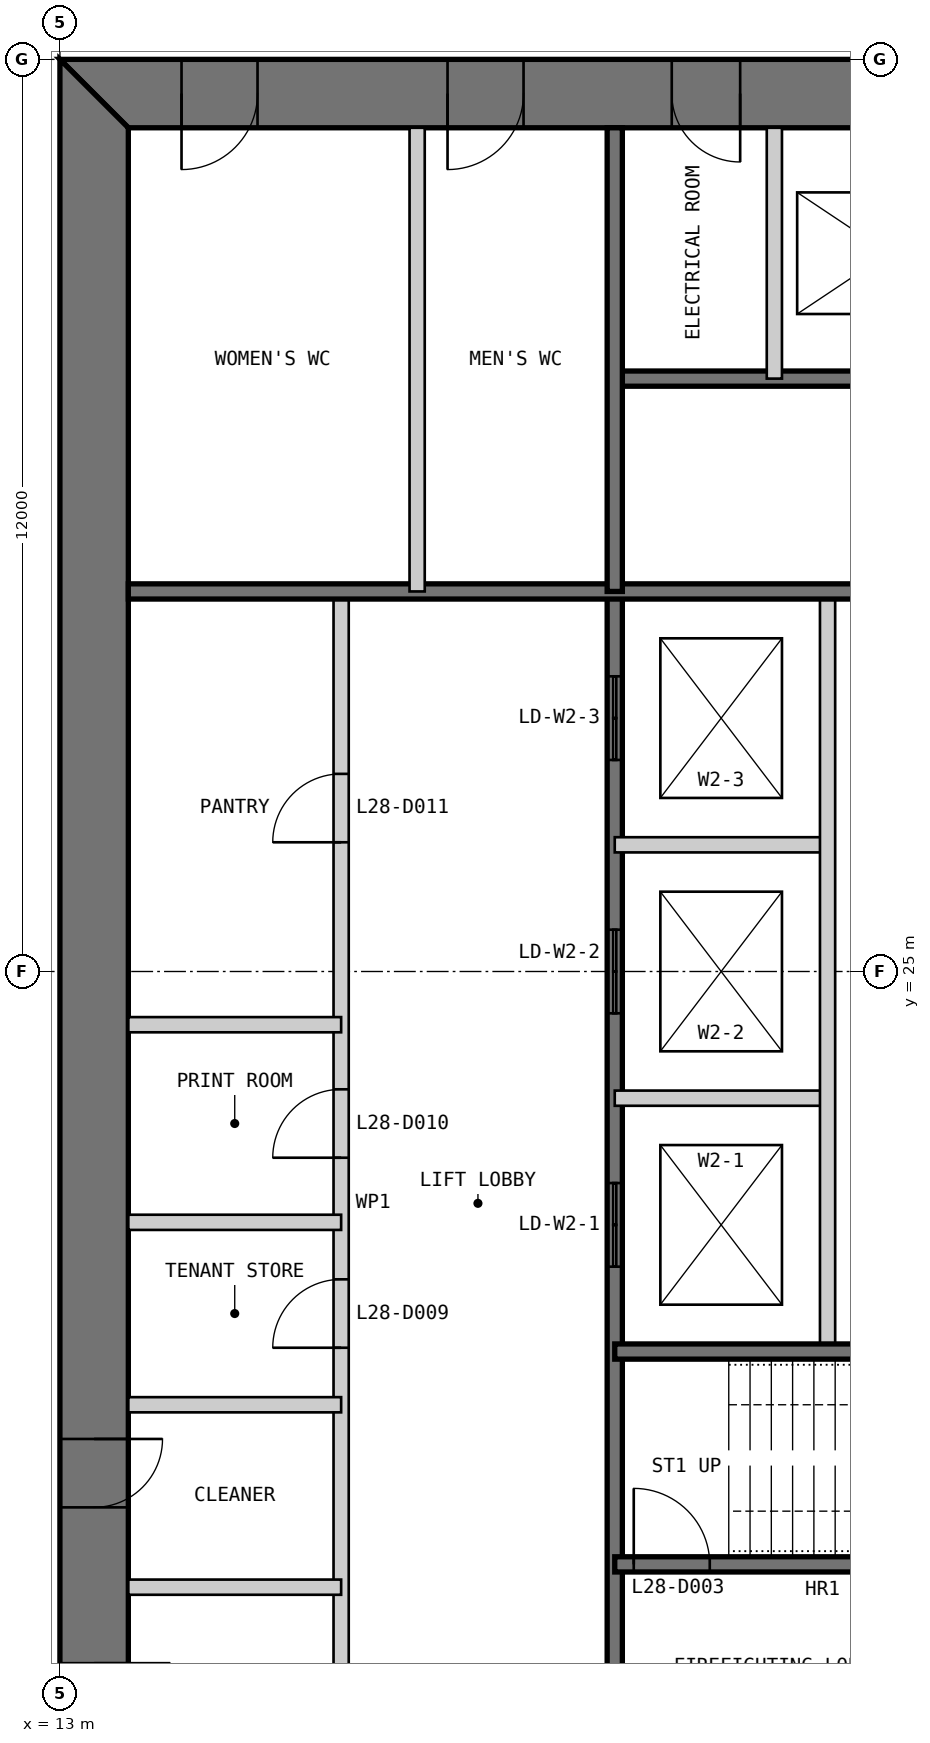
"""IFC4 building model, lengths in metres.
Left out: names, types, materials, properties, quantities, classifications, styles, units other than length and angle.
Written with IfcOpenShell. Run it as: python <this file> out.ifc"""

import sys

from ifc_helpers import new_model, si_unit, direction, frame, frame_2d, origin, place, context, subcontext, project, spatial, polyline, rectangle, outline, extrude, element, fill, save


model = new_model("IFC4")
c1 = context("Model", 3, precision=1e-05, world=origin(), true_north=direction((0.0, 1.0)))
c2 = subcontext(c1, "Body", "Model", "MODEL_VIEW")
j1 = project(units=[si_unit("LENGTHUNIT", "METRE"), si_unit("PLANEANGLEUNIT", "RADIAN")], contexts=[c1])
p1 = place(None, origin())
s1 = spatial("IfcSite", under=j1, at=p1, CompositionType="ELEMENT")
p2 = place(p1, origin())
s2 = spatial("IfcBuilding", under=s1, at=p2, CompositionType="ELEMENT")
p3 = place(p2, frame((0.0, 0.0, 122.4)))
s3 = spatial("IfcBuildingStorey", under=s2, at=p3, CompositionType="ELEMENT", Elevation=122.4)
p4 = place(p3, frame((37.0, 36.55, 0.0), z_axis=(0.0, 0.0, 1.0), x_axis=(-1.0, 0.0, 0.0)))
e1 = element("IfcWall", 1, at=p4, inside=s3, PredefinedType="SHEAR", context=c2, shape_type="SweptSolid", body=[
    extrude(outline(polyline([(0.0, -0.45), (24.0, -0.45), (23.1, 0.45), (0.9, 0.45), (0.0, -0.45)])), origin(), (0.0, 0.0, 1.0), 4.0),
])
p5 = place(p4, frame((4.9, 0.0, 0.0)))
e2 = element("IfcOpeningElement", 2, at=p5, cuts=e1, PredefinedType="OPENING", context=c2, shape_type="SweptSolid", body=[
    extrude(rectangle(XDim=1.0, YDim=2.2, at=frame_2d((0.5, 1.1))), frame((0.0, 0.46, 0.0), z_axis=(0.0, -1.0, 0.0), x_axis=(1.0, 0.0, 0.0)), (0.0, 0.0, 1.0), 0.92),
])
p6 = place(p4, frame((8.9, 0.0, 0.0)))
e3 = element("IfcOpeningElement", 3, at=p6, cuts=e1, PredefinedType="OPENING", context=c2, shape_type="SweptSolid", body=[
    extrude(rectangle(XDim=1.1, YDim=2.2, at=frame_2d((0.55, 1.1))), frame((0.0, 0.46, 0.0), z_axis=(0.0, -1.0, 0.0), x_axis=(1.0, 0.0, 0.0)), (0.0, 0.0, 1.0), 0.92),
])
p7 = place(p4, frame((15.05, 0.0, 0.0)))
e4 = element("IfcOpeningElement", 4, at=p7, cuts=e1, PredefinedType="OPENING", context=c2, shape_type="SweptSolid", body=[
    extrude(rectangle(XDim=0.9, YDim=2.2, at=frame_2d((0.45, 1.1))), frame((0.0, 0.46, 0.0), z_axis=(0.0, -1.0, 0.0), x_axis=(1.0, 0.0, 0.0)), (0.0, 0.0, 1.0), 0.92),
])
p8 = place(p4, frame((17.9, 0.0, 0.0)))
e5 = element("IfcOpeningElement", 5, at=p8, cuts=e1, PredefinedType="OPENING", context=c2, shape_type="SweptSolid", body=[
    extrude(rectangle(XDim=1.0, YDim=2.2, at=frame_2d((0.5, 1.1))), frame((0.0, 0.46, 0.0), z_axis=(0.0, -1.0, 0.0), x_axis=(1.0, 0.0, 0.0)), (0.0, 0.0, 1.0), 0.92),
])
p9 = place(p4, frame((21.4, 0.0, 0.0)))
e6 = element("IfcOpeningElement", 6, at=p9, cuts=e1, PredefinedType="OPENING", context=c2, shape_type="SweptSolid", body=[
    extrude(rectangle(XDim=1.0, YDim=2.2, at=frame_2d((0.5, 1.1))), frame((0.0, 0.46, 0.0), z_axis=(0.0, -1.0, 0.0), x_axis=(1.0, 0.0, 0.0)), (0.0, 0.0, 1.0), 0.92),
])
p10 = place(p3, frame((13.45, 36.1, 0.0), z_axis=(0.0, 0.0, 1.0), x_axis=(0.0, -1.0, 0.0)))
e7 = element("IfcWall", 7, at=p10, inside=s3, PredefinedType="SHEAR", context=c2, shape_type="SweptSolid", body=[
    extrude(outline(polyline([(-0.9, -0.45), (23.1, -0.45), (22.2, 0.45), (0.0, 0.45), (-0.9, -0.45)])), origin(), (0.0, 0.0, 1.0), 4.0),
])
p11 = place(p10, frame((20.2, 0.0, 0.0)))
e8 = element("IfcOpeningElement", 8, at=p11, cuts=e7, PredefinedType="OPENING", context=c2, shape_type="SweptSolid", body=[
    extrude(rectangle(XDim=1.0, YDim=2.2, at=frame_2d((0.5, 1.1))), frame((0.0, 0.46, 0.0), z_axis=(0.0, -1.0, 0.0), x_axis=(1.0, 0.0, 0.0)), (0.0, 0.0, 1.0), 0.92),
])
p12 = place(p10, frame((17.25, 0.0, 0.0)))
e9 = element("IfcOpeningElement", 9, at=p12, cuts=e7, PredefinedType="OPENING", context=c2, shape_type="SweptSolid", body=[
    extrude(rectangle(XDim=0.9, YDim=2.2, at=frame_2d((0.45, 1.1))), frame((0.0, 0.46, 0.0), z_axis=(0.0, -1.0, 0.0), x_axis=(1.0, 0.0, 0.0)), (0.0, 0.0, 1.0), 0.92),
])
p13 = place(p3, frame((16.7, 13.9, 0.0), z_axis=(0.0, 0.0, 1.0), x_axis=(0.0, 1.0, 0.0)))
e10 = element("IfcWall", 10, at=p13, inside=s3, PredefinedType="PARTITIONING", context=c2, shape_type="SweptSolid", body=[
    extrude(rectangle(XDim=16.1, YDim=0.2, at=frame_2d((8.05, 0.0))), origin(), (0.0, 0.0, 1.0), 3.8),
])
p14 = place(p13, frame((6.15, 0.0, 0.0)))
e11 = element("IfcOpeningElement", 11, at=p14, cuts=e10, PredefinedType="OPENING", context=c2, shape_type="SweptSolid", body=[
    extrude(rectangle(XDim=0.9, YDim=2.2, at=frame_2d((0.45, 1.1))), frame((0.0, 0.11, 0.0), z_axis=(0.0, -1.0, 0.0), x_axis=(1.0, 0.0, 0.0)), (0.0, 0.0, 1.0), 0.22),
])
p15 = place(p13, frame((8.65, 0.0, 0.0)))
e12 = element("IfcOpeningElement", 12, at=p15, cuts=e10, PredefinedType="OPENING", context=c2, shape_type="SweptSolid", body=[
    extrude(rectangle(XDim=0.9, YDim=2.2, at=frame_2d((0.45, 1.1))), frame((0.0, 0.11, 0.0), z_axis=(0.0, -1.0, 0.0), x_axis=(1.0, 0.0, 0.0)), (0.0, 0.0, 1.0), 0.22),
])
p16 = place(p13, frame((12.8, 0.0, 0.0)))
e13 = element("IfcOpeningElement", 13, at=p16, cuts=e10, PredefinedType="OPENING", context=c2, shape_type="SweptSolid", body=[
    extrude(rectangle(XDim=0.9, YDim=2.2, at=frame_2d((0.45, 1.1))), frame((0.0, 0.11, 0.0), z_axis=(0.0, -1.0, 0.0), x_axis=(1.0, 0.0, 0.0)), (0.0, 0.0, 1.0), 0.22),
])
p17 = place(p3, frame((20.3, 13.9, 0.0), z_axis=(0.0, 0.0, 1.0), x_axis=(0.0, 1.0, 0.0)))
e14 = element("IfcWall", 14, at=p17, inside=s3, PredefinedType="SOLIDWALL", context=c2, shape_type="SweptSolid", body=[
    extrude(rectangle(XDim=16.1, YDim=0.2, at=frame_2d((8.05, 0.0))), origin(), (0.0, 0.0, 1.0), 3.8),
])
p18 = place(p17, frame((7.217, 0.0, 0.0)))
e15 = element("IfcOpeningElement", 15, at=p18, cuts=e14, PredefinedType="OPENING", context=c2, shape_type="SweptSolid", body=[
    extrude(rectangle(XDim=1.1, YDim=2.2, at=frame_2d((0.55, 1.1))), frame((0.0, 0.11, 0.0), z_axis=(0.0, -1.0, 0.0), x_axis=(1.0, 0.0, 0.0)), (0.0, 0.0, 1.0), 0.22),
])
p19 = place(p17, frame((10.55, 0.0, 0.0)))
e16 = element("IfcOpeningElement", 16, at=p19, cuts=e14, PredefinedType="OPENING", context=c2, shape_type="SweptSolid", body=[
    extrude(rectangle(XDim=1.1, YDim=2.2, at=frame_2d((0.55, 1.1))), frame((0.0, 0.11, 0.0), z_axis=(0.0, -1.0, 0.0), x_axis=(1.0, 0.0, 0.0)), (0.0, 0.0, 1.0), 0.22),
])
p20 = place(p17, frame((13.883, 0.0, 0.0)))
e17 = element("IfcOpeningElement", 17, at=p20, cuts=e14, PredefinedType="OPENING", context=c2, shape_type="SweptSolid", body=[
    extrude(rectangle(XDim=1.1, YDim=2.2, at=frame_2d((0.55, 1.1))), frame((0.0, 0.11, 0.0), z_axis=(0.0, -1.0, 0.0), x_axis=(1.0, 0.0, 0.0)), (0.0, 0.0, 1.0), 0.22),
])
for number, where, z_axis, x_axis in (
    (18, (20.3, 23.333, 0.0), (0.0, 0.0, 1.0), (1.0, 0.0, 0.0)),
    (19, (20.3, 26.667, 0.0), (0.0, 0.0, 1.0), (1.0, 0.0, 0.0)),
):
    element("IfcWall", number, at=place(p3, frame(where, z_axis=z_axis, x_axis=x_axis)), inside=s3, PredefinedType="PARTITIONING", context=c2, shape_type="SweptSolid", body=[
        extrude(rectangle(XDim=2.8, YDim=0.2, at=frame_2d((1.4, 0.0))), origin(), (0.0, 0.0, 1.0), 3.8),
    ])
p21 = place(p3, frame((23.1, 20.0, 0.0), z_axis=(0.0, 0.0, 1.0), x_axis=(0.0, 1.0, 0.0)))
e20 = element("IfcWall", 20, at=p21, inside=s3, PredefinedType="PARTITIONING", context=c2, shape_type="SweptSolid", body=[
    extrude(rectangle(XDim=10.0, YDim=0.2, at=frame_2d((5.0, 0.0))), origin(), (0.0, 0.0, 1.0), 3.8),
])
p22 = place(p3, frame((20.3, 17.2, 0.0), z_axis=(0.0, 0.0, 1.0), x_axis=(1.0, 0.0, 0.0)))
e21 = element("IfcWall", 21, at=p22, inside=s3, PredefinedType="SOLIDWALL", context=c2, shape_type="SweptSolid", body=[
    extrude(rectangle(XDim=9.4, YDim=0.2, at=frame_2d((4.7, 0.0))), origin(), (0.0, 0.0, 1.0), 3.8),
])
p23 = place(p22, frame((0.25, 0.0, 0.0)))
e22 = element("IfcOpeningElement", 22, at=p23, cuts=e21, PredefinedType="OPENING", context=c2, shape_type="SweptSolid", body=[
    extrude(rectangle(XDim=1.0, YDim=2.2, at=frame_2d((0.5, 1.1))), frame((0.0, 0.11, 0.0), z_axis=(0.0, -1.0, 0.0), x_axis=(1.0, 0.0, 0.0)), (0.0, 0.0, 1.0), 0.22),
])
p24 = place(p3, frame((20.3, 20.0, 0.0), z_axis=(0.0, 0.0, 1.0), x_axis=(1.0, 0.0, 0.0)))
e23 = element("IfcWall", 23, at=p24, inside=s3, PredefinedType="SOLIDWALL", context=c2, shape_type="SweptSolid", body=[
    extrude(rectangle(XDim=15.8, YDim=0.2, at=frame_2d((7.9, 0.0))), origin(), (0.0, 0.0, 1.0), 3.8),
])
for number, where, z_axis, x_axis in (
    (24, (13.9, 16.9, 0.0), (0.0, 0.0, 1.0), (1.0, 0.0, 0.0)),
    (25, (13.9, 19.3, 0.0), (0.0, 0.0, 1.0), (1.0, 0.0, 0.0)),
    (26, (13.9, 21.7, 0.0), (0.0, 0.0, 1.0), (1.0, 0.0, 0.0)),
    (27, (13.9, 24.3, 0.0), (0.0, 0.0, 1.0), (1.0, 0.0, 0.0)),
):
    element("IfcWall", number, at=place(p3, frame(where, z_axis=z_axis, x_axis=x_axis)), inside=s3, PredefinedType="PARTITIONING", context=c2, shape_type="SweptSolid", body=[
        extrude(rectangle(XDim=2.8, YDim=0.2, at=frame_2d((1.4, 0.0))), origin(), (0.0, 0.0, 1.0), 3.8),
    ])
p25 = place(p3, frame((29.7, 32.8, 0.0), z_axis=(0.0, 0.0, 1.0), x_axis=(-1.0, 0.0, 0.0)))
e28 = element("IfcWall", 28, at=p25, inside=s3, PredefinedType="SOLIDWALL", context=c2, shape_type="SweptSolid", body=[
    extrude(rectangle(XDim=9.4, YDim=0.2, at=frame_2d((4.7, 0.0))), origin(), (0.0, 0.0, 1.0), 3.8),
])
p26 = place(p25, frame((0.25, 0.0, 0.0)))
e29 = element("IfcOpeningElement", 29, at=p26, cuts=e28, PredefinedType="OPENING", context=c2, shape_type="SweptSolid", body=[
    extrude(rectangle(XDim=1.0, YDim=2.2, at=frame_2d((0.5, 1.1))), frame((0.0, 0.11, 0.0), z_axis=(0.0, -1.0, 0.0), x_axis=(1.0, 0.0, 0.0)), (0.0, 0.0, 1.0), 0.22),
])
p27 = place(p3, frame((29.7, 30.0, 0.0), z_axis=(0.0, 0.0, 1.0), x_axis=(-1.0, 0.0, 0.0)))
e30 = element("IfcWall", 30, at=p27, inside=s3, PredefinedType="SOLIDWALL", context=c2, shape_type="SweptSolid", body=[
    extrude(rectangle(XDim=15.8, YDim=0.2, at=frame_2d((7.9, 0.0))), origin(), (0.0, 0.0, 1.0), 3.8),
])
p28 = place(p3, frame((22.4, 36.1, 0.0), z_axis=(0.0, 0.0, 1.0), x_axis=(0.0, -1.0, 0.0)))
e31 = element("IfcWall", 31, at=p28, inside=s3, PredefinedType="PARTITIONING", context=c2, shape_type="SweptSolid", body=[
    extrude(rectangle(XDim=3.3, YDim=0.2, at=frame_2d((1.65, 0.0))), origin(), (0.0, 0.0, 1.0), 3.8),
])
p29 = place(p3, frame((20.3, 36.1, 0.0), z_axis=(0.0, 0.0, 1.0), x_axis=(0.0, -1.0, 0.0)))
e32 = element("IfcWall", 32, at=p29, inside=s3, PredefinedType="SOLIDWALL", context=c2, shape_type="SweptSolid", body=[
    extrude(rectangle(XDim=6.1, YDim=0.2, at=frame_2d((3.05, 0.0))), origin(), (0.0, 0.0, 1.0), 3.8),
])
p30 = place(p3, frame((17.7, 36.1, 0.0), z_axis=(0.0, 0.0, 1.0), x_axis=(0.0, -1.0, 0.0)))
e33 = element("IfcWall", 33, at=p30, inside=s3, PredefinedType="PARTITIONING", context=c2, shape_type="SweptSolid", body=[
    extrude(rectangle(XDim=6.1, YDim=0.2, at=frame_2d((3.05, 0.0))), origin(), (0.0, 0.0, 1.0), 3.8),
])
p31 = place(p23, origin())
e34 = element("IfcDoor", 34, at=p31, inside=s3, OperationType="SINGLE_SWING_LEFT", PredefinedType="DOOR", context=c2, shape_type="SweptSolid", body=[
    extrude(rectangle(XDim=1.0, YDim=2.2, at=frame_2d((0.5, 1.1))), frame((0.0, 0.025, 0.0), z_axis=(0.0, -1.0, 0.0), x_axis=(1.0, 0.0, 0.0)), (0.0, 0.0, 1.0), 0.05),
])
fill(e22, e34)
p32 = place(p11, origin())
e35 = element("IfcDoor", 35, at=p32, inside=s3, OperationType="SINGLE_SWING_LEFT", PredefinedType="DOOR", context=c2, shape_type="SweptSolid", body=[
    extrude(rectangle(XDim=1.0, YDim=2.2, at=frame_2d((0.5, 1.1))), frame((0.0, 0.025, 0.0), z_axis=(0.0, -1.0, 0.0), x_axis=(1.0, 0.0, 0.0)), (0.0, 0.0, 1.0), 0.05),
    extrude(outline(polyline([(0.0, 0.0), (0.04, 0.0), (0.04, 2.16), (0.96, 2.16), (0.96, 0.0), (1.0, 0.0), (1.0, 2.2), (0.0, 2.2), (0.0, 0.0)])), frame((0.0, 0.3, 0.0), z_axis=(0.0, -1.0, 0.0), x_axis=(1.0, 0.0, 0.0)), (0.0, 0.0, 1.0), 0.6),
])
fill(e8, e35)
p33 = place(p12, origin())
e36 = element("IfcDoor", 36, at=p33, inside=s3, OperationType="SINGLE_SWING_LEFT", PredefinedType="DOOR", context=c2, shape_type="SweptSolid", body=[
    extrude(rectangle(XDim=0.9, YDim=2.2, at=frame_2d((0.45, 1.1))), frame((0.0, 0.025, 0.0), z_axis=(0.0, -1.0, 0.0), x_axis=(1.0, 0.0, 0.0)), (0.0, 0.0, 1.0), 0.05),
    extrude(outline(polyline([(0.0, 0.0), (0.04, 0.0), (0.04, 2.16), (0.86, 2.16), (0.86, 0.0), (0.9, 0.0), (0.9, 2.2), (0.0, 2.2), (0.0, 0.0)])), frame((0.0, 0.3, 0.0), z_axis=(0.0, -1.0, 0.0), x_axis=(1.0, 0.0, 0.0)), (0.0, 0.0, 1.0), 0.6),
])
fill(e9, e36)
p34 = place(p14, origin())
e37 = element("IfcDoor", 37, at=p34, inside=s3, OperationType="SINGLE_SWING_LEFT", PredefinedType="DOOR", context=c2, shape_type="SweptSolid", body=[
    extrude(rectangle(XDim=0.9, YDim=2.2, at=frame_2d((0.45, 1.1))), frame((0.0, 0.025, 0.0), z_axis=(0.0, -1.0, 0.0), x_axis=(1.0, 0.0, 0.0)), (0.0, 0.0, 1.0), 0.05),
])
fill(e11, e37)
p35 = place(p15, origin())
e38 = element("IfcDoor", 38, at=p35, inside=s3, OperationType="SINGLE_SWING_LEFT", PredefinedType="DOOR", context=c2, shape_type="SweptSolid", body=[
    extrude(rectangle(XDim=0.9, YDim=2.2, at=frame_2d((0.45, 1.1))), frame((0.0, 0.025, 0.0), z_axis=(0.0, -1.0, 0.0), x_axis=(1.0, 0.0, 0.0)), (0.0, 0.0, 1.0), 0.05),
])
fill(e12, e38)
p36 = place(p16, origin())
e39 = element("IfcDoor", 39, at=p36, inside=s3, OperationType="SINGLE_SWING_LEFT", PredefinedType="DOOR", context=c2, shape_type="SweptSolid", body=[
    extrude(rectangle(XDim=0.9, YDim=2.2, at=frame_2d((0.45, 1.1))), frame((0.0, 0.025, 0.0), z_axis=(0.0, -1.0, 0.0), x_axis=(1.0, 0.0, 0.0)), (0.0, 0.0, 1.0), 0.05),
])
fill(e13, e39)
p37 = place(p7, origin())
e40 = element("IfcDoor", 40, at=p37, inside=s3, OperationType="SINGLE_SWING_LEFT", PredefinedType="DOOR", context=c2, shape_type="SweptSolid", body=[
    extrude(rectangle(XDim=0.9, YDim=2.2, at=frame_2d((0.45, 1.1))), frame((0.0, 0.025, 0.0), z_axis=(0.0, -1.0, 0.0), x_axis=(1.0, 0.0, 0.0)), (0.0, 0.0, 1.0), 0.05),
    extrude(outline(polyline([(0.0, 0.0), (0.04, 0.0), (0.04, 2.16), (0.86, 2.16), (0.86, 0.0), (0.9, 0.0), (0.9, 2.2), (0.0, 2.2), (0.0, 0.0)])), frame((0.0, 0.3, 0.0), z_axis=(0.0, -1.0, 0.0), x_axis=(1.0, 0.0, 0.0)), (0.0, 0.0, 1.0), 0.6),
])
fill(e4, e40)
p38 = place(p8, origin())
e41 = element("IfcDoor", 41, at=p38, inside=s3, OperationType="SINGLE_SWING_RIGHT", PredefinedType="DOOR", context=c2, shape_type="SweptSolid", body=[
    extrude(rectangle(XDim=1.0, YDim=2.2, at=frame_2d((0.5, 1.1))), frame((0.0, 0.025, 0.0), z_axis=(0.0, -1.0, 0.0), x_axis=(1.0, 0.0, 0.0)), (0.0, 0.0, 1.0), 0.05),
    extrude(outline(polyline([(0.0, 0.0), (0.04, 0.0), (0.04, 2.16), (0.96, 2.16), (0.96, 0.0), (1.0, 0.0), (1.0, 2.2), (0.0, 2.2), (0.0, 0.0)])), frame((0.0, 0.3, 0.0), z_axis=(0.0, -1.0, 0.0), x_axis=(1.0, 0.0, 0.0)), (0.0, 0.0, 1.0), 0.6),
])
fill(e5, e41)
p39 = place(p9, origin())
e42 = element("IfcDoor", 42, at=p39, inside=s3, OperationType="SINGLE_SWING_RIGHT", PredefinedType="DOOR", context=c2, shape_type="SweptSolid", body=[
    extrude(rectangle(XDim=1.0, YDim=2.2, at=frame_2d((0.5, 1.1))), frame((0.0, 0.025, 0.0), z_axis=(0.0, -1.0, 0.0), x_axis=(1.0, 0.0, 0.0)), (0.0, 0.0, 1.0), 0.05),
    extrude(outline(polyline([(0.0, 0.0), (0.04, 0.0), (0.04, 2.16), (0.96, 2.16), (0.96, 0.0), (1.0, 0.0), (1.0, 2.2), (0.0, 2.2), (0.0, 0.0)])), frame((0.0, 0.3, 0.0), z_axis=(0.0, -1.0, 0.0), x_axis=(1.0, 0.0, 0.0)), (0.0, 0.0, 1.0), 0.6),
])
fill(e6, e42)
p40 = place(p18, origin())
e43 = element("IfcDoor", 43, at=p40, inside=s3, OperationType="DOUBLE_DOOR_SLIDING", PredefinedType="DOOR", context=c2, shape_type="SweptSolid", body=[
    extrude(rectangle(XDim=1.1, YDim=2.2, at=frame_2d((0.55, 1.1))), frame((0.0, 0.025, 0.0), z_axis=(0.0, -1.0, 0.0), x_axis=(1.0, 0.0, 0.0)), (0.0, 0.0, 1.0), 0.05),
])
fill(e15, e43)
p41 = place(p19, origin())
e44 = element("IfcDoor", 44, at=p41, inside=s3, OperationType="DOUBLE_DOOR_SLIDING", PredefinedType="DOOR", context=c2, shape_type="SweptSolid", body=[
    extrude(rectangle(XDim=1.1, YDim=2.2, at=frame_2d((0.55, 1.1))), frame((0.0, 0.025, 0.0), z_axis=(0.0, -1.0, 0.0), x_axis=(1.0, 0.0, 0.0)), (0.0, 0.0, 1.0), 0.05),
])
fill(e16, e44)
p42 = place(p20, origin())
e45 = element("IfcDoor", 45, at=p42, inside=s3, OperationType="DOUBLE_DOOR_SLIDING", PredefinedType="DOOR", context=c2, shape_type="SweptSolid", body=[
    extrude(rectangle(XDim=1.1, YDim=2.2, at=frame_2d((0.55, 1.1))), frame((0.0, 0.025, 0.0), z_axis=(0.0, -1.0, 0.0), x_axis=(1.0, 0.0, 0.0)), (0.0, 0.0, 1.0), 0.05),
])
fill(e17, e45)
save(model, sys.argv[1])
